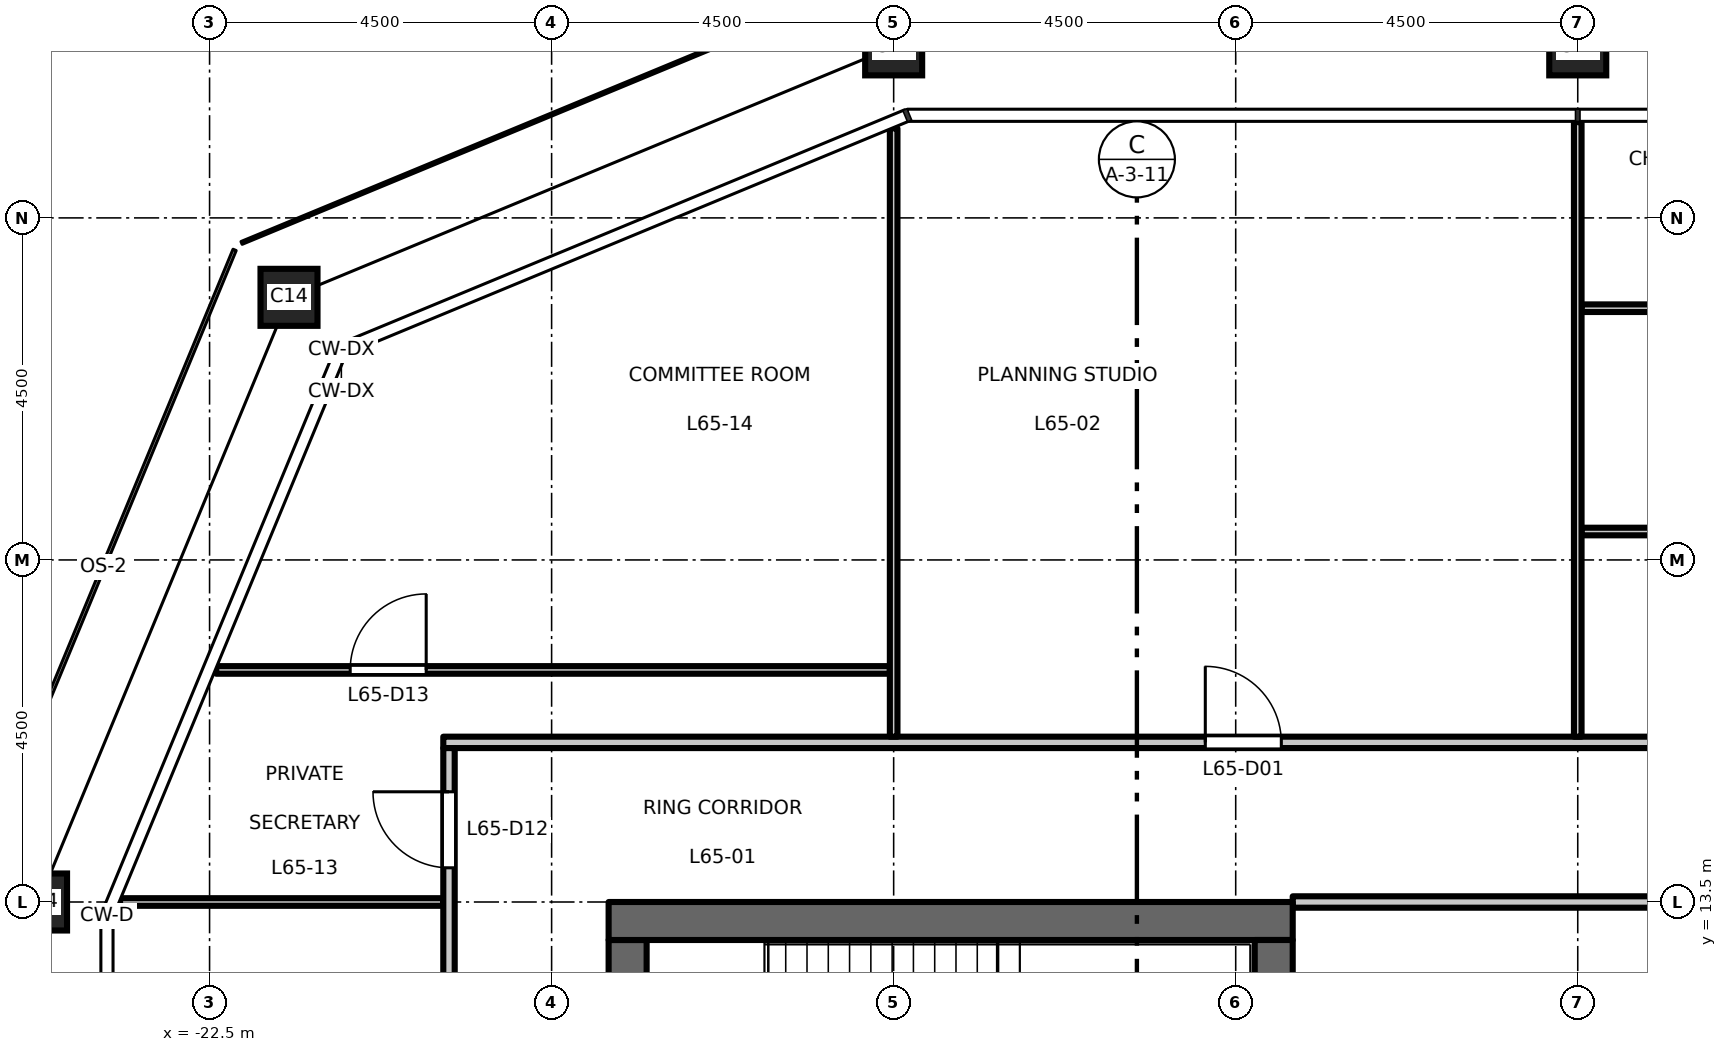
"""IFC4 building model, lengths in metres.
Left out: names, types, materials, properties, quantities, classifications, styles, units other than length and angle.
Written with IfcOpenShell. Run it as: python <this file> out.ifc"""

import sys

from ifc_helpers import new_model, si_unit, direction, frame, frame_2d, origin, origin_2d, place, context, subcontext, project, spatial, rectangle, hollow_rectangle, extrude, element, fill, save


model = new_model("IFC4")
c1 = context("Model", 3, precision=1e-05, world=origin(), true_north=direction((0.0, 1.0)))
c2 = subcontext(c1, "Body", "Model", "MODEL_VIEW")
j1 = project(units=[si_unit("LENGTHUNIT", "METRE"), si_unit("PLANEANGLEUNIT", "RADIAN")], contexts=[c1])
p1 = place(None, origin())
s1 = spatial("IfcSite", under=j1, at=p1, CompositionType="ELEMENT")
p2 = place(p1, origin())
s2 = spatial("IfcBuilding", under=s1, at=p2, CompositionType="ELEMENT")
p3 = place(p2, frame((0.0, 0.0, 303.2)))
s3 = spatial("IfcBuildingStorey", under=s2, at=p3, CompositionType="ELEMENT", Elevation=303.2)
for number, where, z_axis, x_axis in (
    (1, (-4.5, 24.75, 0.0), (0.0, 0.0, 1.0), (1.0, 0.0, 0.0)),
    (2, (-13.5, 24.75, 0.0), (0.0, 0.0, 1.0), (1.0, 0.0, 0.0)),
    (3, (-21.455, 21.455, 0.0), (0.0, 0.0, 1.0), (1.0, 0.0, 0.0)),
    (4, (-24.75, 13.5, 0.0), (0.0, 0.0, 1.0), (1.0, 0.0, 0.0)),
):
    element("IfcColumn", number, at=place(p3, frame(where, z_axis=z_axis, x_axis=x_axis)), inside=s3, PredefinedType="COLUMN", context=c2, shape_type="SweptSolid", body=[
        extrude(hollow_rectangle(XDim=0.75, YDim=0.75, WallThickness=0.04, at=origin_2d()), origin(), (0.0, 0.0, 1.0), 4.5),
    ])
p4 = place(p3, frame((-17.0, -13.0, 0.0), z_axis=(0.0, 0.0, 1.0), x_axis=(0.0, 1.0, 0.0)))
e5 = element("IfcWall", 5, at=p4, inside=s3, PredefinedType="SHEAR", context=c2, shape_type="SweptSolid", body=[
    extrude(rectangle(XDim=26.0, YDim=0.5, at=frame_2d((13.0, 0.0))), origin(), (0.0, 0.0, 1.0), 4.35),
])
p5 = place(p4, frame((16.825, 0.0, 0.0)))
e6 = element("IfcOpeningElement", 6, at=p5, cuts=e5, PredefinedType="OPENING", context=c2, shape_type="SweptSolid", body=[
    extrude(rectangle(XDim=1.8, YDim=2.1, at=frame_2d((0.9, 1.05))), frame((0.0, 0.26, 0.0), z_axis=(0.0, -1.0, 0.0), x_axis=(1.0, 0.0, 0.0)), (0.0, 0.0, 1.0), 0.52),
])
p6 = place(p4, frame((7.375, 0.0, 0.0)))
e7 = element("IfcOpeningElement", 7, at=p6, cuts=e5, PredefinedType="OPENING", context=c2, shape_type="SweptSolid", body=[
    extrude(rectangle(XDim=1.8, YDim=2.1, at=frame_2d((0.9, 1.05))), frame((0.0, 0.26, 0.0), z_axis=(0.0, -1.0, 0.0), x_axis=(1.0, 0.0, 0.0)), (0.0, 0.0, 1.0), 0.52),
])
p7 = place(p3, frame((-8.25, 13.25, 0.0), z_axis=(0.0, 0.0, 1.0), x_axis=(-1.0, 0.0, 0.0)))
e8 = element("IfcWall", 8, at=p7, inside=s3, PredefinedType="SHEAR", context=c2, shape_type="SweptSolid", body=[
    extrude(rectangle(XDim=9.0, YDim=0.5, at=frame_2d((4.5, 0.0))), origin(), (0.0, 0.0, 1.0), 4.35),
])
p8 = place(p3, frame((-8.5, -13.0, 0.0), z_axis=(0.0, 0.0, 1.0), x_axis=(0.0, 1.0, 0.0)))
e9 = element("IfcWall", 9, at=p8, inside=s3, PredefinedType="SHEAR", context=c2, shape_type="SweptSolid", body=[
    extrude(rectangle(XDim=26.0, YDim=0.5, at=frame_2d((13.0, 0.0))), origin(), (0.0, 0.0, 1.0), 4.35),
])
p9 = place(p3, frame((-23.678, 13.5, 0.0), z_axis=(0.0, 0.0, 1.0), x_axis=(1.0, 0.0, 0.0)))
e10 = element("IfcWall", 10, at=p9, inside=s3, PredefinedType="PARTITIONING", context=c2, shape_type="SweptSolid", body=[
    extrude(rectangle(XDim=4.253, YDim=0.1, at=frame_2d((2.126, 0.0))), origin(), (0.0, 0.0, 1.0), 4.35),
])
p10 = place(p3, frame((-8.25, 13.5, 0.0), z_axis=(0.0, 0.0, 1.0), x_axis=(1.0, 0.0, 0.0)))
e11 = element("IfcWall", 11, at=p10, inside=s3, PredefinedType="PARTITIONING", context=c2, shape_type="SweptSolid", body=[
    extrude(rectangle(XDim=16.5, YDim=0.15, at=frame_2d((8.25, 0.0))), origin(), (0.0, 0.0, 1.0), 4.35),
])
p11 = place(p10, frame((7.65, 0.0, 0.0)))
e12 = element("IfcOpeningElement", 12, at=p11, cuts=e11, PredefinedType="OPENING", context=c2, shape_type="SweptSolid", body=[
    extrude(rectangle(XDim=1.0, YDim=2.1, at=frame_2d((0.5, 1.05))), frame((0.0, 0.085, 0.0), z_axis=(0.0, -1.0, 0.0), x_axis=(1.0, 0.0, 0.0)), (0.0, 0.0, 1.0), 0.17),
])
p12 = place(p3, frame((-19.425, 15.6, 0.0), z_axis=(0.0, 0.0, 1.0), x_axis=(1.0, 0.0, 0.0)))
e13 = element("IfcWall", 13, at=p12, inside=s3, PredefinedType="PARTITIONING", context=c2, shape_type="SweptSolid", body=[
    extrude(rectangle(XDim=38.85, YDim=0.15, at=frame_2d((19.425, 0.0))), origin(), (0.0, 0.0, 1.0), 4.35),
])
p13 = place(p12, frame((10.025, 0.0, 0.0)))
e14 = element("IfcOpeningElement", 14, at=p13, cuts=e13, PredefinedType="OPENING", context=c2, shape_type="SweptSolid", body=[
    extrude(rectangle(XDim=1.0, YDim=2.1, at=frame_2d((0.5, 1.05))), frame((0.0, 0.085, 0.0), z_axis=(0.0, -1.0, 0.0), x_axis=(1.0, 0.0, 0.0)), (0.0, 0.0, 1.0), 0.17),
])
p14 = place(p12, frame((19.025, 0.0, 0.0)))
e15 = element("IfcOpeningElement", 15, at=p14, cuts=e13, PredefinedType="OPENING", context=c2, shape_type="SweptSolid", body=[
    extrude(rectangle(XDim=1.0, YDim=2.1, at=frame_2d((0.5, 1.05))), frame((0.0, 0.085, 0.0), z_axis=(0.0, -1.0, 0.0), x_axis=(1.0, 0.0, 0.0)), (0.0, 0.0, 1.0), 0.17),
])
p15 = place(p12, frame((28.025, 0.0, 0.0)))
e16 = element("IfcOpeningElement", 16, at=p15, cuts=e13, PredefinedType="OPENING", context=c2, shape_type="SweptSolid", body=[
    extrude(rectangle(XDim=1.0, YDim=2.1, at=frame_2d((0.5, 1.05))), frame((0.0, 0.085, 0.0), z_axis=(0.0, -1.0, 0.0), x_axis=(1.0, 0.0, 0.0)), (0.0, 0.0, 1.0), 0.17),
])
p16 = place(p3, frame((-22.413, 16.553, 0.0), z_axis=(0.0, 0.0, 1.0), x_axis=(1.0, 0.0, 0.0)))
e17 = element("IfcWall", 17, at=p16, inside=s3, PredefinedType="PARTITIONING", context=c2, shape_type="SweptSolid", body=[
    extrude(rectangle(XDim=8.863, YDim=0.1, at=frame_2d((4.432, 0.0))), origin(), (0.0, 0.0, 1.0), 4.35),
])
p17 = place(p16, frame((1.763, 0.0, 0.0)))
e18 = element("IfcOpeningElement", 18, at=p17, cuts=e17, PredefinedType="OPENING", context=c2, shape_type="SweptSolid", body=[
    extrude(rectangle(XDim=1.0, YDim=2.1, at=frame_2d((0.5, 1.05))), frame((0.0, 0.06, 0.0), z_axis=(0.0, -1.0, 0.0), x_axis=(1.0, 0.0, 0.0)), (0.0, 0.0, 1.0), 0.12),
])
p18 = place(p3, frame((-4.45, 18.374, 0.0), z_axis=(0.0, 0.0, 1.0), x_axis=(1.0, 0.0, 0.0)))
e19 = element("IfcWall", 19, at=p18, inside=s3, PredefinedType="PARTITIONING", context=c2, shape_type="SweptSolid", body=[
    extrude(rectangle(XDim=8.9, YDim=0.1, at=frame_2d((4.45, 0.0))), origin(), (0.0, 0.0, 1.0), 4.35),
])
p19 = place(p18, frame((4.05, 0.0, 0.0)))
e20 = element("IfcOpeningElement", 20, at=p19, cuts=e19, PredefinedType="OPENING", context=c2, shape_type="SweptSolid", body=[
    extrude(rectangle(XDim=1.0, YDim=2.1, at=frame_2d((0.5, 1.05))), frame((0.0, 0.06, 0.0), z_axis=(0.0, -1.0, 0.0), x_axis=(1.0, 0.0, 0.0)), (0.0, 0.0, 1.0), 0.12),
])
p20 = place(p3, frame((-4.45, 21.312, 0.0), z_axis=(0.0, 0.0, 1.0), x_axis=(1.0, 0.0, 0.0)))
e21 = element("IfcWall", 21, at=p20, inside=s3, PredefinedType="PARTITIONING", context=c2, shape_type="SweptSolid", body=[
    extrude(rectangle(XDim=8.9, YDim=0.1, at=frame_2d((4.45, 0.0))), origin(), (0.0, 0.0, 1.0), 4.35),
])
p21 = place(p20, frame((4.05, 0.0, 0.0)))
e22 = element("IfcOpeningElement", 22, at=p21, cuts=e21, PredefinedType="OPENING", context=c2, shape_type="SweptSolid", body=[
    extrude(rectangle(XDim=1.0, YDim=2.1, at=frame_2d((0.5, 1.05))), frame((0.0, 0.06, 0.0), z_axis=(0.0, -1.0, 0.0), x_axis=(1.0, 0.0, 0.0)), (0.0, 0.0, 1.0), 0.12),
])
p22 = place(p3, frame((-19.35, -15.525, 0.0), z_axis=(0.0, 0.0, 1.0), x_axis=(0.0, 1.0, 0.0)))
e23 = element("IfcWall", 23, at=p22, inside=s3, PredefinedType="PARTITIONING", context=c2, shape_type="SweptSolid", body=[
    extrude(rectangle(XDim=31.05, YDim=0.15, at=frame_2d((15.525, 0.0))), origin(), (0.0, 0.0, 1.0), 4.35),
])
p23 = place(p22, frame((29.475, 0.0, 0.0)))
e24 = element("IfcOpeningElement", 24, at=p23, cuts=e23, PredefinedType="OPENING", context=c2, shape_type="SweptSolid", body=[
    extrude(rectangle(XDim=1.0, YDim=2.1, at=frame_2d((0.5, 1.05))), frame((0.0, 0.085, 0.0), z_axis=(0.0, -1.0, 0.0), x_axis=(1.0, 0.0, 0.0)), (0.0, 0.0, 1.0), 0.17),
])
p24 = place(p22, frame((6.125, 0.0, 0.0)))
e25 = element("IfcOpeningElement", 25, at=p24, cuts=e23, PredefinedType="OPENING", context=c2, shape_type="SweptSolid", body=[
    extrude(rectangle(XDim=1.0, YDim=2.1, at=frame_2d((0.5, 1.05))), frame((0.0, 0.085, 0.0), z_axis=(0.0, -1.0, 0.0), x_axis=(1.0, 0.0, 0.0)), (0.0, 0.0, 1.0), 0.17),
])
p25 = place(p22, frame((15.125, 0.0, 0.0)))
e26 = element("IfcOpeningElement", 26, at=p25, cuts=e23, PredefinedType="OPENING", context=c2, shape_type="SweptSolid", body=[
    extrude(rectangle(XDim=1.0, YDim=2.1, at=frame_2d((0.5, 1.05))), frame((0.0, 0.085, 0.0), z_axis=(0.0, -1.0, 0.0), x_axis=(1.0, 0.0, 0.0)), (0.0, 0.0, 1.0), 0.17),
])
p26 = place(p22, frame((24.125, 0.0, 0.0)))
e27 = element("IfcOpeningElement", 27, at=p26, cuts=e23, PredefinedType="OPENING", context=c2, shape_type="SweptSolid", body=[
    extrude(rectangle(XDim=1.0, YDim=2.1, at=frame_2d((0.5, 1.05))), frame((0.0, 0.085, 0.0), z_axis=(0.0, -1.0, 0.0), x_axis=(1.0, 0.0, 0.0)), (0.0, 0.0, 1.0), 0.17),
])
p27 = place(p3, frame((-13.5, 15.675, 0.0), z_axis=(0.0, 0.0, 1.0), x_axis=(0.0, 1.0, 0.0)))
e28 = element("IfcWall", 28, at=p27, inside=s3, PredefinedType="PARTITIONING", context=c2, shape_type="SweptSolid", body=[
    extrude(rectangle(XDim=8.003, YDim=0.1, at=frame_2d((4.001, 0.0))), origin(), (0.0, 0.0, 1.0), 3.75),
])
p28 = place(p3, frame((-4.5, 15.675, 0.0), z_axis=(0.0, 0.0, 1.0), x_axis=(0.0, 1.0, 0.0)))
e29 = element("IfcWall", 29, at=p28, inside=s3, PredefinedType="PARTITIONING", context=c2, shape_type="SweptSolid", body=[
    extrude(rectangle(XDim=8.085, YDim=0.1, at=frame_2d((4.042, 0.0))), origin(), (0.0, 0.0, 1.0), 3.65),
])
p29 = place(p13, origin())
e30 = element("IfcDoor", 30, at=p29, inside=s3, OperationType="SINGLE_SWING_LEFT", PredefinedType="DOOR", context=c2, shape_type="SweptSolid", body=[
    extrude(rectangle(XDim=1.0, YDim=2.1, at=frame_2d((0.5, 1.05))), frame((0.0, 0.025, 0.0), z_axis=(0.0, -1.0, 0.0), x_axis=(1.0, 0.0, 0.0)), (0.0, 0.0, 1.0), 0.05),
])
fill(e14, e30)
p30 = place(p23, origin())
e31 = element("IfcDoor", 31, at=p30, inside=s3, OperationType="SINGLE_SWING_RIGHT", PredefinedType="DOOR", context=c2, shape_type="SweptSolid", body=[
    extrude(rectangle(XDim=1.0, YDim=2.1, at=frame_2d((0.5, 1.05))), frame((0.0, 0.025, 0.0), z_axis=(0.0, -1.0, 0.0), x_axis=(1.0, 0.0, 0.0)), (0.0, 0.0, 1.0), 0.05),
])
fill(e24, e31)
p31 = place(p17, origin())
e32 = element("IfcDoor", 32, at=p31, inside=s3, OperationType="SINGLE_SWING_RIGHT", PredefinedType="DOOR", context=c2, shape_type="SweptSolid", body=[
    extrude(rectangle(XDim=1.0, YDim=2.1, at=frame_2d((0.5, 1.05))), frame((0.0, 0.025, 0.0), z_axis=(0.0, -1.0, 0.0), x_axis=(1.0, 0.0, 0.0)), (0.0, 0.0, 1.0), 0.05),
])
fill(e18, e32)
save(model, sys.argv[1])
